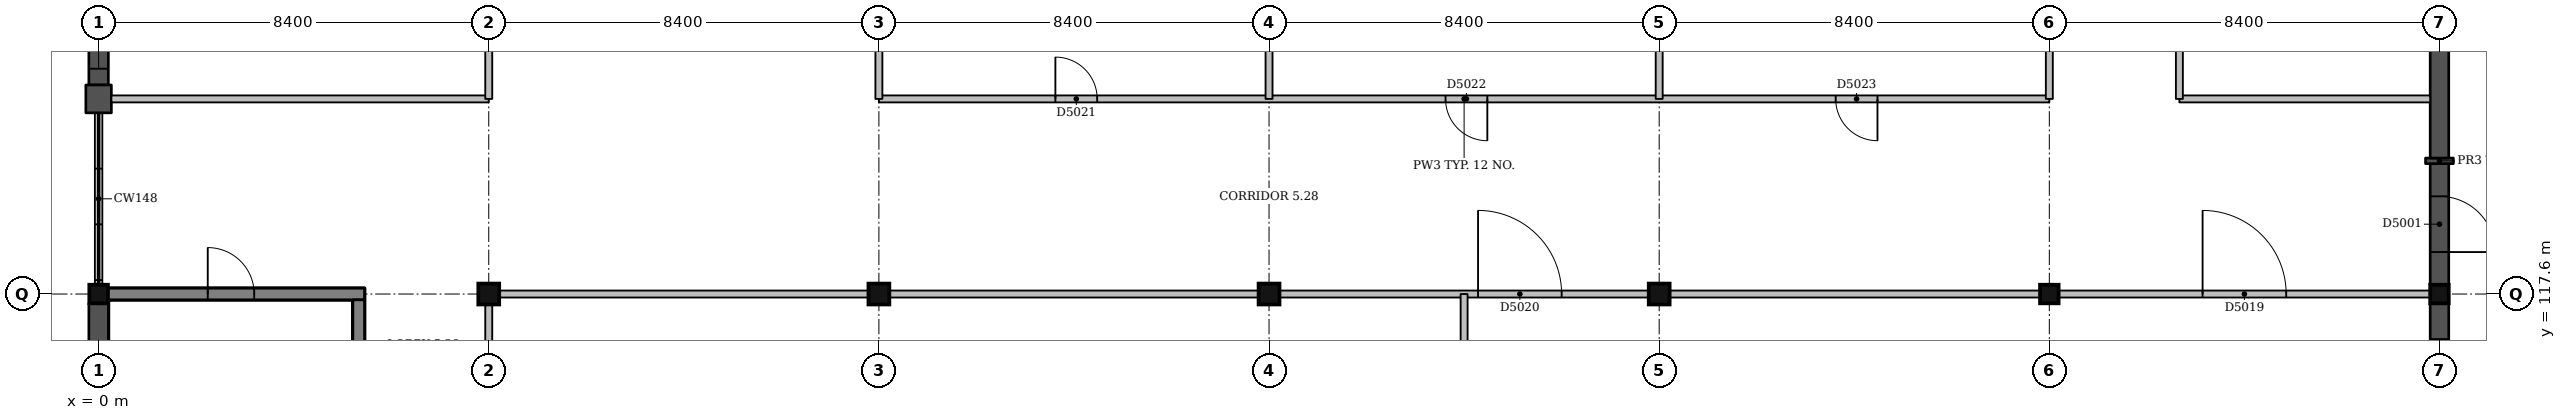
"""IFC4 building model, lengths in metres.
Left out: names, types, materials, properties, quantities, classifications, styles, units other than length and angle.
Written with IfcOpenShell. Run it as: python <this file> out.ifc"""

import sys

from ifc_helpers import new_model, si_unit, direction, frame, frame_2d, origin, origin_2d, place, context, subcontext, project, spatial, rectangle, extrude, element, fill, save


model = new_model("IFC4")
c1 = context("Model", 3, precision=1e-05, world=origin(), true_north=direction((0.0, 1.0)))
c2 = subcontext(c1, "Body", "Model", "MODEL_VIEW")
j1 = project(units=[si_unit("LENGTHUNIT", "METRE"), si_unit("PLANEANGLEUNIT", "RADIAN")], contexts=[c1])
p1 = place(None, origin())
s1 = spatial("IfcSite", under=j1, at=p1, CompositionType="ELEMENT")
p2 = place(p1, origin())
s2 = spatial("IfcBuilding", under=s1, at=p2, CompositionType="ELEMENT")
p3 = place(p2, frame((0.0, 0.0, 22.5)))
s3 = spatial("IfcBuildingStorey", under=s2, at=p3, CompositionType="ELEMENT", Elevation=22.5)
p4 = place(p3, frame((0.0, 117.6, 0.0), z_axis=(0.0, 0.0, 1.0), x_axis=(1.0, 0.0, 0.0)))
e1 = element("IfcColumn", 1, at=p4, inside=s3, PredefinedType="COLUMN", context=c2, shape_type="SweptSolid", body=[
    extrude(rectangle(XDim=0.4, YDim=0.4, at=origin_2d()), origin(), (0.0, 0.0, 1.0), 4.5),
])
for number, where, z_axis, x_axis in (
    (2, (8.4, 117.6, 0.0), (0.0, 0.0, 1.0), (1.0, 0.0, 0.0)),
    (3, (16.8, 117.6, 0.0), (0.0, 0.0, 1.0), (1.0, 0.0, 0.0)),
    (4, (25.2, 117.6, 0.0), (0.0, 0.0, 1.0), (1.0, 0.0, 0.0)),
    (5, (33.6, 117.6, 0.0), (0.0, 0.0, 1.0), (1.0, 0.0, 0.0)),
):
    element("IfcColumn", number, at=place(p3, frame(where, z_axis=z_axis, x_axis=x_axis)), inside=s3, PredefinedType="COLUMN", context=c2, shape_type="SweptSolid", body=[
        extrude(rectangle(XDim=0.45, YDim=0.45, at=origin_2d()), origin(), (0.0, 0.0, 1.0), 4.5),
    ])
for number, where, z_axis, x_axis in (
    (6, (42.0, 117.6, 0.0), (0.0, 0.0, 1.0), (1.0, 0.0, 0.0)),
    (7, (50.4, 117.6, 0.0), (0.0, 0.0, 1.0), (1.0, 0.0, 0.0)),
):
    element("IfcColumn", number, at=place(p3, frame(where, z_axis=z_axis, x_axis=x_axis)), inside=s3, PredefinedType="COLUMN", context=c2, shape_type="SweptSolid", body=[
        extrude(rectangle(XDim=0.4, YDim=0.4, at=origin_2d()), origin(), (0.0, 0.0, 1.0), 4.5),
    ])
p5 = place(p3, frame((0.2, 117.6, 0.0), z_axis=(0.0, 0.0, 1.0), x_axis=(1.0, 0.0, 0.0)))
e8 = element("IfcWall", 8, at=p5, inside=s3, PredefinedType="SHEAR", context=c2, shape_type="SweptSolid", body=[
    extrude(rectangle(XDim=5.525, YDim=0.25, at=frame_2d((2.763, 0.0))), origin(), (0.0, 0.0, 1.0), 4.5),
])
p6 = place(p5, frame((2.15, 0.0, 0.0)))
e9 = element("IfcOpeningElement", 9, at=p6, cuts=e8, PredefinedType="OPENING", context=c2, shape_type="SweptSolid", body=[
    extrude(rectangle(XDim=1.0, YDim=2.1, at=frame_2d((0.5, 1.05))), frame((0.0, 0.135, 0.0), z_axis=(0.0, -1.0, 0.0), x_axis=(1.0, 0.0, 0.0)), (0.0, 0.0, 1.0), 0.27),
])
p7 = place(p3, frame((5.6, 113.41, 0.0), z_axis=(0.0, 0.0, 1.0), x_axis=(0.0, 1.0, 0.0)))
e10 = element("IfcWall", 10, at=p7, inside=s3, PredefinedType="SHEAR", context=c2, shape_type="SweptSolid", body=[
    extrude(rectangle(XDim=4.065, YDim=0.25, at=frame_2d((2.033, 0.0))), origin(), (0.0, 0.0, 1.0), 4.5),
])
p8 = place(p3, frame((50.4, 113.46, 0.0), z_axis=(0.0, 0.0, 1.0), x_axis=(0.0, 1.0, 0.0)))
e11 = element("IfcWall", 11, at=p8, inside=s3, PredefinedType="SOLIDWALL", context=c2, shape_type="SweptSolid", body=[
    extrude(rectangle(XDim=3.94, YDim=0.4, at=frame_2d((1.97, 0.0))), origin(), (0.0, 0.0, 1.0), 3.35),
])
p9 = place(p8, frame((0.77, 0.0, 0.6)))
e12 = element("IfcOpeningElement", 12, at=p9, cuts=e11, PredefinedType="OPENING", context=c2, shape_type="SweptSolid", body=[
    extrude(rectangle(XDim=2.4, YDim=2.4, at=frame_2d((1.2, 1.2))), frame((0.0, 0.21, 0.0), z_axis=(0.0, -1.0, 0.0), x_axis=(1.0, 0.0, 0.0)), (0.0, 0.0, 1.0), 0.42),
])
p10 = place(p3, frame((50.4, 117.8, 0.0), z_axis=(0.0, 0.0, 1.0), x_axis=(0.0, 1.0, 0.0)))
e13 = element("IfcWall", 13, at=p10, inside=s3, PredefinedType="SOLIDWALL", context=c2, shape_type="SweptSolid", body=[
    extrude(rectangle(XDim=2.607, YDim=0.4, at=frame_2d((1.303, 0.0))), origin(), (0.0, 0.0, 1.0), 3.35),
])
p11 = place(p10, frame((0.703, 0.0, 0.0)))
e14 = element("IfcOpeningElement", 14, at=p11, cuts=e13, PredefinedType="OPENING", context=c2, shape_type="SweptSolid", body=[
    extrude(rectangle(XDim=1.2, YDim=2.1, at=frame_2d((0.6, 1.05))), frame((0.0, 0.21, 0.0), z_axis=(0.0, -1.0, 0.0), x_axis=(1.0, 0.0, 0.0)), (0.0, 0.0, 1.0), 0.42),
])
p12 = place(p3, frame((50.4, 120.407, 0.0), z_axis=(0.0, 0.0, 1.0), x_axis=(0.0, 1.0, 0.0)))
e15 = element("IfcWall", 15, at=p12, inside=s3, PredefinedType="SOLIDWALL", context=c2, shape_type="SweptSolid", body=[
    extrude(rectangle(XDim=0.12, YDim=0.6, at=frame_2d((0.06, 0.0))), origin(), (0.0, 0.0, 1.0), 3.35),
])
p13 = place(p3, frame((50.4, 120.527, 0.0), z_axis=(0.0, 0.0, 1.0), x_axis=(0.0, 1.0, 0.0)))
e16 = element("IfcWall", 16, at=p13, inside=s3, PredefinedType="SOLIDWALL", context=c2, shape_type="SweptSolid", body=[
    extrude(rectangle(XDim=2.547, YDim=0.4, at=frame_2d((1.273, 0.0))), origin(), (0.0, 0.0, 1.0), 3.35),
])
p14 = place(p3, frame((0.0, 125.8, 0.0), z_axis=(0.0, 0.0, 1.0), x_axis=(0.0, -1.0, 0.0)))
e17 = element("IfcWall", 17, at=p14, inside=s3, PredefinedType="SOLIDWALL", context=c2, shape_type="SweptSolid", body=[
    extrude(rectangle(XDim=3.7, YDim=0.42, at=frame_2d((1.85, 0.0))), origin(), (0.0, 0.0, 1.0), 3.35),
])
p15 = place(p14, frame((0.35, 0.0, 1.0)))
e18 = element("IfcOpeningElement", 18, at=p15, cuts=e17, PredefinedType="OPENING", context=c2, shape_type="SweptSolid", body=[
    extrude(rectangle(XDim=0.6, YDim=1.8, at=frame_2d((0.3, 0.9))), frame((0.0, 0.22, 0.0), z_axis=(0.0, -1.0, 0.0), x_axis=(1.0, 0.0, 0.0)), (0.0, 0.0, 1.0), 0.44),
])
p16 = place(p14, frame((1.55, 0.0, 1.0)))
e19 = element("IfcOpeningElement", 19, at=p16, cuts=e17, PredefinedType="OPENING", context=c2, shape_type="SweptSolid", body=[
    extrude(rectangle(XDim=0.6, YDim=1.8, at=frame_2d((0.3, 0.9))), frame((0.0, 0.22, 0.0), z_axis=(0.0, -1.0, 0.0), x_axis=(1.0, 0.0, 0.0)), (0.0, 0.0, 1.0), 0.44),
])
p17 = place(p14, frame((2.75, 0.0, 1.0)))
e20 = element("IfcOpeningElement", 20, at=p17, cuts=e17, PredefinedType="OPENING", context=c2, shape_type="SweptSolid", body=[
    extrude(rectangle(XDim=0.6, YDim=1.8, at=frame_2d((0.3, 0.9))), frame((0.0, 0.22, 0.0), z_axis=(0.0, -1.0, 0.0), x_axis=(1.0, 0.0, 0.0)), (0.0, 0.0, 1.0), 0.44),
])
p18 = place(p3, frame((0.0, 122.1, 0.0), z_axis=(0.0, 0.0, 1.0), x_axis=(0.0, -1.0, 0.0)))
e21 = element("IfcWall", 21, at=p18, inside=s3, PredefinedType="SOLIDWALL", context=c2, shape_type="SweptSolid", body=[
    extrude(rectangle(XDim=0.6, YDim=0.55, at=frame_2d((0.3, 0.0))), origin(), (0.0, 0.0, 1.0), 3.35),
])
p19 = place(p3, frame((0.0, 117.4, 0.0), z_axis=(0.0, 0.0, 1.0), x_axis=(0.0, -1.0, 0.0)))
e22 = element("IfcWall", 22, at=p19, inside=s3, PredefinedType="SOLIDWALL", context=c2, shape_type="SweptSolid", body=[
    extrude(rectangle(XDim=3.7, YDim=0.42, at=frame_2d((1.85, 0.0))), origin(), (0.0, 0.0, 1.0), 4.5),
])
p20 = place(p3, frame((8.625, 117.6, 0.0), z_axis=(0.0, 0.0, 1.0), x_axis=(1.0, 0.0, 0.0)))
e23 = element("IfcWall", 23, at=p20, inside=s3, PredefinedType="PARTITIONING", context=c2, shape_type="SweptSolid", body=[
    extrude(rectangle(XDim=7.95, YDim=0.15, at=frame_2d((3.975, 0.0))), origin(), (0.0, 0.0, 1.0), 3.4),
])
p21 = place(p3, frame((17.025, 117.6, 0.0), z_axis=(0.0, 0.0, 1.0), x_axis=(1.0, 0.0, 0.0)))
e24 = element("IfcWall", 24, at=p21, inside=s3, PredefinedType="PARTITIONING", context=c2, shape_type="SweptSolid", body=[
    extrude(rectangle(XDim=7.95, YDim=0.15, at=frame_2d((3.975, 0.0))), origin(), (0.0, 0.0, 1.0), 3.4),
])
p22 = place(p3, frame((25.425, 117.6, 0.0), z_axis=(0.0, 0.0, 1.0), x_axis=(1.0, 0.0, 0.0)))
e25 = element("IfcWall", 25, at=p22, inside=s3, PredefinedType="PARTITIONING", context=c2, shape_type="SweptSolid", body=[
    extrude(rectangle(XDim=7.95, YDim=0.15, at=frame_2d((3.975, 0.0))), origin(), (0.0, 0.0, 1.0), 3.4),
])
p23 = place(p22, frame((4.275, 0.0, 0.0)))
e26 = element("IfcOpeningElement", 26, at=p23, cuts=e25, PredefinedType="OPENING", context=c2, shape_type="SweptSolid", body=[
    extrude(rectangle(XDim=1.8, YDim=2.1, at=frame_2d((0.9, 1.05))), frame((0.0, 0.085, 0.0), z_axis=(0.0, -1.0, 0.0), x_axis=(1.0, 0.0, 0.0)), (0.0, 0.0, 1.0), 0.17),
])
p24 = place(p3, frame((33.825, 117.6, 0.0), z_axis=(0.0, 0.0, 1.0), x_axis=(1.0, 0.0, 0.0)))
e27 = element("IfcWall", 27, at=p24, inside=s3, PredefinedType="PARTITIONING", context=c2, shape_type="SweptSolid", body=[
    extrude(rectangle(XDim=7.975, YDim=0.15, at=frame_2d((3.988, 0.0))), origin(), (0.0, 0.0, 1.0), 3.4),
])
p25 = place(p3, frame((42.2, 117.6, 0.0), z_axis=(0.0, 0.0, 1.0), x_axis=(1.0, 0.0, 0.0)))
e28 = element("IfcWall", 28, at=p25, inside=s3, PredefinedType="PARTITIONING", context=c2, shape_type="SweptSolid", body=[
    extrude(rectangle(XDim=8.0, YDim=0.15, at=frame_2d((4.0, 0.0))), origin(), (0.0, 0.0, 1.0), 3.35),
])
p26 = place(p25, frame((3.1, 0.0, 0.0)))
e29 = element("IfcOpeningElement", 29, at=p26, cuts=e28, PredefinedType="OPENING", context=c2, shape_type="SweptSolid", body=[
    extrude(rectangle(XDim=1.8, YDim=2.1, at=frame_2d((0.9, 1.05))), frame((0.0, 0.085, 0.0), z_axis=(0.0, -1.0, 0.0), x_axis=(1.0, 0.0, 0.0)), (0.0, 0.0, 1.0), 0.17),
])
p27 = place(p3, frame((0.275, 121.8, 0.0), z_axis=(0.0, 0.0, 1.0), x_axis=(1.0, 0.0, 0.0)))
e30 = element("IfcWall", 30, at=p27, inside=s3, PredefinedType="PARTITIONING", context=c2, shape_type="SweptSolid", body=[
    extrude(rectangle(XDim=8.125, YDim=0.15, at=frame_2d((4.062, 0.0))), origin(), (0.0, 0.0, 1.0), 3.4),
])
p28 = place(p3, frame((16.8, 121.8, 0.0), z_axis=(0.0, 0.0, 1.0), x_axis=(1.0, 0.0, 0.0)))
e31 = element("IfcWall", 31, at=p28, inside=s3, PredefinedType="PARTITIONING", context=c2, shape_type="SweptSolid", body=[
    extrude(rectangle(XDim=25.2, YDim=0.15, at=frame_2d((12.6, 0.0))), origin(), (0.0, 0.0, 1.0), 3.4),
])
p29 = place(p28, frame((3.8, 0.0, 0.0)))
e32 = element("IfcOpeningElement", 32, at=p29, cuts=e31, PredefinedType="OPENING", context=c2, shape_type="SweptSolid", body=[
    extrude(rectangle(XDim=0.9, YDim=2.1, at=frame_2d((0.45, 1.05))), frame((0.0, 0.085, 0.0), z_axis=(0.0, -1.0, 0.0), x_axis=(1.0, 0.0, 0.0)), (0.0, 0.0, 1.0), 0.17),
])
p30 = place(p28, frame((12.2, 0.0, 0.0)))
e33 = element("IfcOpeningElement", 33, at=p30, cuts=e31, PredefinedType="OPENING", context=c2, shape_type="SweptSolid", body=[
    extrude(rectangle(XDim=0.9, YDim=2.1, at=frame_2d((0.45, 1.05))), frame((0.0, 0.085, 0.0), z_axis=(0.0, -1.0, 0.0), x_axis=(1.0, 0.0, 0.0)), (0.0, 0.0, 1.0), 0.17),
])
p31 = place(p28, frame((20.6, 0.0, 0.0)))
e34 = element("IfcOpeningElement", 34, at=p31, cuts=e31, PredefinedType="OPENING", context=c2, shape_type="SweptSolid", body=[
    extrude(rectangle(XDim=0.9, YDim=2.1, at=frame_2d((0.45, 1.05))), frame((0.0, 0.085, 0.0), z_axis=(0.0, -1.0, 0.0), x_axis=(1.0, 0.0, 0.0)), (0.0, 0.0, 1.0), 0.17),
])
p32 = place(p3, frame((44.8, 121.8, 0.0), z_axis=(0.0, 0.0, 1.0), x_axis=(1.0, 0.0, 0.0)))
e35 = element("IfcWall", 35, at=p32, inside=s3, PredefinedType="PARTITIONING", context=c2, shape_type="SweptSolid", body=[
    extrude(rectangle(XDim=5.4, YDim=0.15, at=frame_2d((2.7, 0.0))), origin(), (0.0, 0.0, 1.0), 3.35),
])
p33 = place(p3, frame((8.4, 113.55, 0.0), z_axis=(0.0, 0.0, 1.0), x_axis=(0.0, 1.0, 0.0)))
e36 = element("IfcWall", 36, at=p33, inside=s3, PredefinedType="PARTITIONING", context=c2, shape_type="SweptSolid", body=[
    extrude(rectangle(XDim=3.825, YDim=0.15, at=frame_2d((1.913, 0.0))), origin(), (0.0, 0.0, 1.0), 3.4),
])
p34 = place(p33, frame((1.0, 0.0, 0.0)))
e37 = element("IfcOpeningElement", 37, at=p34, cuts=e36, PredefinedType="OPENING", context=c2, shape_type="SweptSolid", body=[
    extrude(rectangle(XDim=1.8, YDim=2.1, at=frame_2d((0.9, 1.05))), frame((0.0, 0.085, 0.0), z_axis=(0.0, -1.0, 0.0), x_axis=(1.0, 0.0, 0.0)), (0.0, 0.0, 1.0), 0.17),
])
p35 = place(p3, frame((8.4, 121.8, 0.0), z_axis=(0.0, 0.0, 1.0), x_axis=(0.0, 1.0, 0.0)))
e38 = element("IfcWall", 38, at=p35, inside=s3, PredefinedType="PARTITIONING", context=c2, shape_type="SweptSolid", body=[
    extrude(rectangle(XDim=3.975, YDim=0.15, at=frame_2d((1.987, 0.0))), origin(), (0.0, 0.0, 1.0), 3.4),
])
p36 = place(p35, frame((1.35, 0.0, 0.0)))
e39 = element("IfcOpeningElement", 39, at=p36, cuts=e38, PredefinedType="OPENING", context=c2, shape_type="SweptSolid", body=[
    extrude(rectangle(XDim=1.0, YDim=2.1, at=frame_2d((0.5, 1.05))), frame((0.0, 0.085, 0.0), z_axis=(0.0, -1.0, 0.0), x_axis=(1.0, 0.0, 0.0)), (0.0, 0.0, 1.0), 0.17),
])
for number, where, z_axis, x_axis in (
    (40, (16.8, 121.8, 0.0), (0.0, 0.0, 1.0), (0.0, 1.0, 0.0)),
    (41, (25.2, 121.8, 0.0), (0.0, 0.0, 1.0), (0.0, 1.0, 0.0)),
):
    element("IfcWall", number, at=place(p3, frame(where, z_axis=z_axis, x_axis=x_axis)), inside=s3, PredefinedType="PARTITIONING", context=c2, shape_type="SweptSolid", body=[
        extrude(rectangle(XDim=3.975, YDim=0.15, at=frame_2d((1.987, 0.0))), origin(), (0.0, 0.0, 1.0), 3.4),
    ])
p37 = place(p3, frame((29.4, 109.4, 0.0), z_axis=(0.0, 0.0, 1.0), x_axis=(0.0, 1.0, 0.0)))
e42 = element("IfcWall", 42, at=p37, inside=s3, PredefinedType="PARTITIONING", context=c2, shape_type="SweptSolid", body=[
    extrude(rectangle(XDim=8.2, YDim=0.15, at=frame_2d((4.1, 0.0))), origin(), (0.0, 0.0, 1.0), 3.4),
])
p38 = place(p3, frame((33.6, 121.8, 0.0), z_axis=(0.0, 0.0, 1.0), x_axis=(0.0, 1.0, 0.0)))
e43 = element("IfcWall", 43, at=p38, inside=s3, PredefinedType="PARTITIONING", context=c2, shape_type="SweptSolid", body=[
    extrude(rectangle(XDim=3.975, YDim=0.15, at=frame_2d((1.987, 0.0))), origin(), (0.0, 0.0, 1.0), 3.4),
])
p39 = place(p3, frame((42.0, 121.8, 0.0), z_axis=(0.0, 0.0, 1.0), x_axis=(0.0, 1.0, 0.0)))
e44 = element("IfcWall", 44, at=p39, inside=s3, PredefinedType="PARTITIONING", context=c2, shape_type="SweptSolid", body=[
    extrude(rectangle(XDim=4.0, YDim=0.15, at=frame_2d((2.0, 0.0))), origin(), (0.0, 0.0, 1.0), 3.4),
])
p40 = place(p3, frame((44.8, 121.8, 0.0), z_axis=(0.0, 0.0, 1.0), x_axis=(0.0, 1.0, 0.0)))
e45 = element("IfcWall", 45, at=p40, inside=s3, PredefinedType="PARTITIONING", context=c2, shape_type="SweptSolid", body=[
    extrude(rectangle(XDim=12.6, YDim=0.15, at=frame_2d((6.3, 0.0))), origin(), (0.0, 0.0, 1.0), 3.27),
])
p41 = place(p40, frame((1.7, 0.0, 0.0)))
e46 = element("IfcOpeningElement", 46, at=p41, cuts=e45, PredefinedType="OPENING", context=c2, shape_type="SweptSolid", body=[
    extrude(rectangle(XDim=0.9, YDim=2.1, at=frame_2d((0.45, 1.05))), frame((0.0, 0.085, 0.0), z_axis=(0.0, -1.0, 0.0), x_axis=(1.0, 0.0, 0.0)), (0.0, 0.0, 1.0), 0.17),
])
p42 = place(p40, frame((8.0, 0.0, 0.0)))
e47 = element("IfcOpeningElement", 47, at=p42, cuts=e45, PredefinedType="OPENING", context=c2, shape_type="SweptSolid", body=[
    extrude(rectangle(XDim=0.9, YDim=2.1, at=frame_2d((0.45, 1.05))), frame((0.0, 0.085, 0.0), z_axis=(0.0, -1.0, 0.0), x_axis=(1.0, 0.0, 0.0)), (0.0, 0.0, 1.0), 0.17),
])
p43 = place(p9, origin())
e48 = element("IfcWindow", 48, at=p43, inside=s3, PartitioningType="SINGLE_PANEL", PredefinedType="WINDOW", context=c2, shape_type="SweptSolid", body=[
    extrude(rectangle(XDim=2.4, YDim=2.4, at=frame_2d((1.2, 1.2))), frame((0.0, 0.16, 0.0), z_axis=(0.0, -1.0, 0.0), x_axis=(1.0, 0.0, 0.0)), (0.0, 0.0, 1.0), 0.06),
])
fill(e12, e48)
p44 = place(p11, origin())
e49 = element("IfcDoor", 49, at=p44, inside=s3, OperationType="SINGLE_SWING_LEFT", PredefinedType="DOOR", context=c2, shape_type="SweptSolid", body=[
    extrude(rectangle(XDim=1.2, YDim=2.1, at=frame_2d((0.6, 1.05))), frame((0.0, 0.025, 0.0), z_axis=(0.0, -1.0, 0.0), x_axis=(1.0, 0.0, 0.0)), (0.0, 0.0, 1.0), 0.05),
])
fill(e14, e49)
p45 = place(p17, origin())
e50 = element("IfcWindow", 50, at=p45, inside=s3, PartitioningType="SINGLE_PANEL", PredefinedType="WINDOW", context=c2, shape_type="SweptSolid", body=[
    extrude(rectangle(XDim=0.6, YDim=1.8, at=frame_2d((0.3, 0.9))), frame((0.0, 0.15, 0.0), z_axis=(0.0, -1.0, 0.0), x_axis=(1.0, 0.0, 0.0)), (0.0, 0.0, 1.0), 0.06),
])
fill(e20, e50)
p46 = place(p26, origin())
e51 = element("IfcDoor", 51, at=p46, inside=s3, OperationType="DOUBLE_DOOR_SINGLE_SWING", PredefinedType="DOOR", context=c2, shape_type="SweptSolid", body=[
    extrude(rectangle(XDim=1.8, YDim=2.1, at=frame_2d((0.9, 1.05))), frame((0.0, 0.025, 0.0), z_axis=(0.0, -1.0, 0.0), x_axis=(1.0, 0.0, 0.0)), (0.0, 0.0, 1.0), 0.05),
])
fill(e29, e51)
p47 = place(p23, origin())
e52 = element("IfcDoor", 52, at=p47, inside=s3, OperationType="DOUBLE_DOOR_SINGLE_SWING", PredefinedType="DOOR", context=c2, shape_type="SweptSolid", body=[
    extrude(rectangle(XDim=1.8, YDim=2.1, at=frame_2d((0.9, 1.05))), frame((0.0, 0.025, 0.0), z_axis=(0.0, -1.0, 0.0), x_axis=(1.0, 0.0, 0.0)), (0.0, 0.0, 1.0), 0.05),
])
fill(e26, e52)
p48 = place(p29, origin())
e53 = element("IfcDoor", 53, at=p48, inside=s3, OperationType="SINGLE_SWING_LEFT", PredefinedType="DOOR", context=c2, shape_type="SweptSolid", body=[
    extrude(rectangle(XDim=0.9, YDim=2.1, at=frame_2d((0.45, 1.05))), frame((0.0, 0.025, 0.0), z_axis=(0.0, -1.0, 0.0), x_axis=(1.0, 0.0, 0.0)), (0.0, 0.0, 1.0), 0.05),
])
fill(e32, e53)
p49 = place(p30, origin())
e54 = element("IfcDoor", 54, at=p49, inside=s3, OperationType="SINGLE_SWING_RIGHT", PredefinedType="DOOR", context=c2, shape_type="SweptSolid", body=[
    extrude(rectangle(XDim=0.9, YDim=2.1, at=frame_2d((0.45, 1.05))), frame((0.0, 0.025, 0.0), z_axis=(0.0, -1.0, 0.0), x_axis=(1.0, 0.0, 0.0)), (0.0, 0.0, 1.0), 0.05),
])
fill(e33, e54)
p50 = place(p31, origin())
e55 = element("IfcDoor", 55, at=p50, inside=s3, OperationType="SINGLE_SWING_RIGHT", PredefinedType="DOOR", context=c2, shape_type="SweptSolid", body=[
    extrude(rectangle(XDim=0.9, YDim=2.1, at=frame_2d((0.45, 1.05))), frame((0.0, 0.025, 0.0), z_axis=(0.0, -1.0, 0.0), x_axis=(1.0, 0.0, 0.0)), (0.0, 0.0, 1.0), 0.05),
])
fill(e34, e55)
p51 = place(p6, origin())
e56 = element("IfcDoor", 56, at=p51, inside=s3, OperationType="SINGLE_SWING_LEFT", PredefinedType="DOOR", context=c2, shape_type="SweptSolid", body=[
    extrude(rectangle(XDim=1.0, YDim=2.1, at=frame_2d((0.5, 1.05))), frame((0.0, 0.025, 0.0), z_axis=(0.0, -1.0, 0.0), x_axis=(1.0, 0.0, 0.0)), (0.0, 0.0, 1.0), 0.05),
])
fill(e9, e56)
save(model, sys.argv[1])
